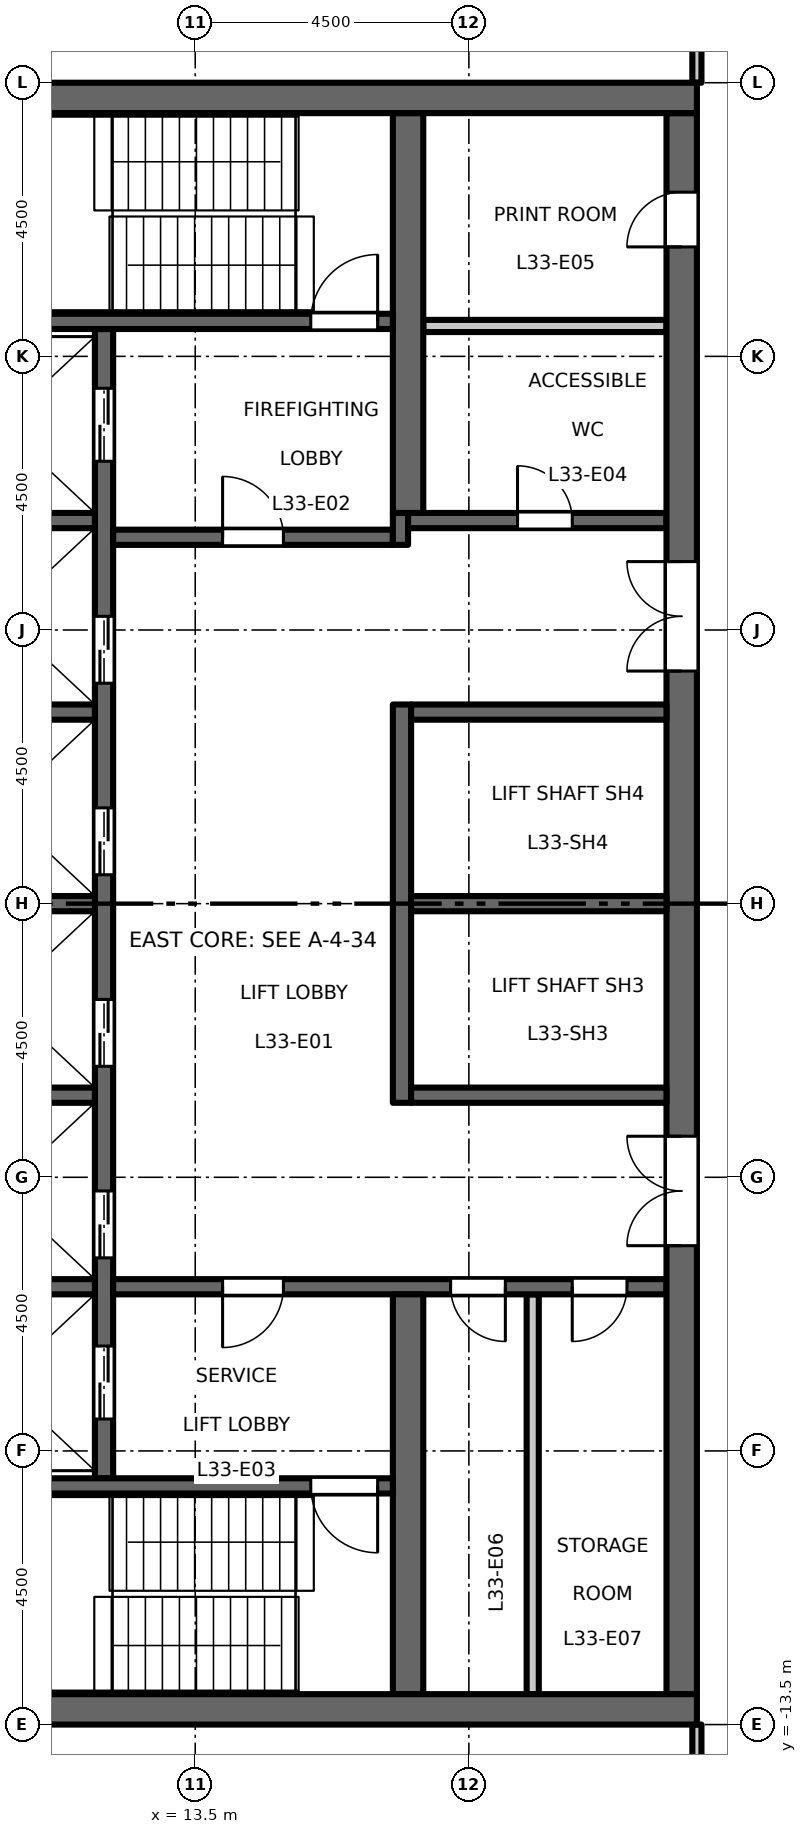
"""IFC4 building model, lengths in metres.
Left out: names, types, materials, properties, quantities, classifications, styles, units other than length and angle.
Written with IfcOpenShell. Run it as: python <this file> out.ifc"""

import sys

from ifc_helpers import new_model, si_unit, direction, frame, frame_2d, origin, place, context, subcontext, project, spatial, rectangle, extrude, element, fill, save


model = new_model("IFC4")
c1 = context("Model", 3, precision=1e-05, world=origin(), true_north=direction((0.0, 1.0)))
c2 = subcontext(c1, "Body", "Model", "MODEL_VIEW")
j1 = project(units=[si_unit("LENGTHUNIT", "METRE"), si_unit("PLANEANGLEUNIT", "RADIAN")], contexts=[c1])
p1 = place(None, origin())
s1 = spatial("IfcSite", under=j1, at=p1, CompositionType="ELEMENT")
p2 = place(p1, origin())
s2 = spatial("IfcBuilding", under=s1, at=p2, CompositionType="ELEMENT")
p3 = place(p2, frame((0.0, 0.0, 154.2)))
s3 = spatial("IfcBuildingStorey", under=s2, at=p3, CompositionType="ELEMENT", Elevation=154.2)
p4 = place(p3, frame((12.0, -9.45, 0.0), z_axis=(0.0, 0.0, 1.0), x_axis=(0.0, 1.0, 0.0)))
e1 = element("IfcWall", 1, at=p4, inside=s3, PredefinedType="SHEAR", context=c2, shape_type="SweptSolid", body=[
    extrude(rectangle(XDim=18.9, YDim=0.3, at=frame_2d((9.45, 0.0))), origin(), (0.0, 0.0, 1.0), 4.35),
])
p5 = place(p4, frame((3.625, 0.0, 0.0)))
e2 = element("IfcOpeningElement", 2, at=p5, cuts=e1, PredefinedType="OPENING", context=c2, shape_type="SweptSolid", body=[
    extrude(rectangle(XDim=1.1, YDim=2.1, at=frame_2d((0.55, 1.05))), frame((0.0, 0.16, 0.0), z_axis=(0.0, -1.0, 0.0), x_axis=(1.0, 0.0, 0.0)), (0.0, 0.0, 1.0), 0.32),
])
p6 = place(p4, frame((6.775, 0.0, 0.0)))
e3 = element("IfcOpeningElement", 3, at=p6, cuts=e1, PredefinedType="OPENING", context=c2, shape_type="SweptSolid", body=[
    extrude(rectangle(XDim=1.1, YDim=2.1, at=frame_2d((0.55, 1.05))), frame((0.0, 0.16, 0.0), z_axis=(0.0, -1.0, 0.0), x_axis=(1.0, 0.0, 0.0)), (0.0, 0.0, 1.0), 0.32),
])
p7 = place(p4, frame((9.925, 0.0, 0.0)))
e4 = element("IfcOpeningElement", 4, at=p7, cuts=e1, PredefinedType="OPENING", context=c2, shape_type="SweptSolid", body=[
    extrude(rectangle(XDim=1.1, YDim=2.1, at=frame_2d((0.55, 1.05))), frame((0.0, 0.16, 0.0), z_axis=(0.0, -1.0, 0.0), x_axis=(1.0, 0.0, 0.0)), (0.0, 0.0, 1.0), 0.32),
])
p8 = place(p4, frame((13.075, 0.0, 0.0)))
e5 = element("IfcOpeningElement", 5, at=p8, cuts=e1, PredefinedType="OPENING", context=c2, shape_type="SweptSolid", body=[
    extrude(rectangle(XDim=1.1, YDim=2.1, at=frame_2d((0.55, 1.05))), frame((0.0, 0.16, 0.0), z_axis=(0.0, -1.0, 0.0), x_axis=(1.0, 0.0, 0.0)), (0.0, 0.0, 1.0), 0.32),
])
p9 = place(p4, frame((16.725, 0.0, 0.0)))
e6 = element("IfcOpeningElement", 6, at=p9, cuts=e1, PredefinedType="OPENING", context=c2, shape_type="SweptSolid", body=[
    extrude(rectangle(XDim=1.2, YDim=2.1, at=frame_2d((0.6, 1.05))), frame((0.0, 0.16, 0.0), z_axis=(0.0, -1.0, 0.0), x_axis=(1.0, 0.0, 0.0)), (0.0, 0.0, 1.0), 0.32),
])
p10 = place(p4, frame((0.975, 0.0, 0.0)))
e7 = element("IfcOpeningElement", 7, at=p10, cuts=e1, PredefinedType="OPENING", context=c2, shape_type="SweptSolid", body=[
    extrude(rectangle(XDim=1.2, YDim=2.1, at=frame_2d((0.6, 1.05))), frame((0.0, 0.16, 0.0), z_axis=(0.0, -1.0, 0.0), x_axis=(1.0, 0.0, 0.0)), (0.0, 0.0, 1.0), 0.32),
])
p11 = place(p3, frame((12.15, 6.025, 0.0), z_axis=(0.0, 0.0, 1.0), x_axis=(1.0, 0.0, 0.0)))
e8 = element("IfcWall", 8, at=p11, inside=s3, PredefinedType="SHEAR", context=c2, shape_type="SweptSolid", body=[
    extrude(rectangle(XDim=4.6, YDim=0.25, at=frame_2d((2.3, 0.0))), origin(), (0.0, 0.0, 1.0), 4.35),
])
p12 = place(p11, frame((1.8, 0.0, 0.0)))
e9 = element("IfcOpeningElement", 9, at=p12, cuts=e8, PredefinedType="OPENING", context=c2, shape_type="SweptSolid", body=[
    extrude(rectangle(XDim=1.0, YDim=2.1, at=frame_2d((0.5, 1.05))), frame((0.0, 0.135, 0.0), z_axis=(0.0, -1.0, 0.0), x_axis=(1.0, 0.0, 0.0)), (0.0, 0.0, 1.0), 0.27),
])
p13 = place(p3, frame((16.875, 5.9, 0.0), z_axis=(0.0, 0.0, 1.0), x_axis=(0.0, 1.0, 0.0)))
e10 = element("IfcWall", 10, at=p13, inside=s3, PredefinedType="SHEAR", context=c2, shape_type="SweptSolid", body=[
    extrude(rectangle(XDim=0.525, YDim=0.25, at=frame_2d((0.263, 0.0))), origin(), (0.0, 0.0, 1.0), 4.35),
])
p14 = place(p3, frame((17.0, 6.3, 0.0), z_axis=(0.0, 0.0, 1.0), x_axis=(1.0, 0.0, 0.0)))
e11 = element("IfcWall", 11, at=p14, inside=s3, PredefinedType="SHEAR", context=c2, shape_type="SweptSolid", body=[
    extrude(rectangle(XDim=4.25, YDim=0.25, at=frame_2d((2.125, 0.0))), origin(), (0.0, 0.0, 1.0), 4.35),
])
p15 = place(p14, frame((1.8, 0.0, 0.0)))
e12 = element("IfcOpeningElement", 12, at=p15, cuts=e11, PredefinedType="OPENING", context=c2, shape_type="SweptSolid", body=[
    extrude(rectangle(XDim=0.9, YDim=2.1, at=frame_2d((0.45, 1.05))), frame((0.0, 0.135, 0.0), z_axis=(0.0, -1.0, 0.0), x_axis=(1.0, 0.0, 0.0)), (0.0, 0.0, 1.0), 0.27),
])
p16 = place(p3, frame((12.15, -6.3, 0.0), z_axis=(0.0, 0.0, 1.0), x_axis=(1.0, 0.0, 0.0)))
e13 = element("IfcWall", 13, at=p16, inside=s3, PredefinedType="SHEAR", context=c2, shape_type="SweptSolid", body=[
    extrude(rectangle(XDim=9.1, YDim=0.25, at=frame_2d((4.55, 0.0))), origin(), (0.0, 0.0, 1.0), 4.35),
])
p17 = place(p16, frame((1.8, 0.0, 0.0)))
e14 = element("IfcOpeningElement", 14, at=p17, cuts=e13, PredefinedType="OPENING", context=c2, shape_type="SweptSolid", body=[
    extrude(rectangle(XDim=1.0, YDim=2.1, at=frame_2d((0.5, 1.05))), frame((0.0, 0.135, 0.0), z_axis=(0.0, -1.0, 0.0), x_axis=(1.0, 0.0, 0.0)), (0.0, 0.0, 1.0), 0.27),
])
p18 = place(p16, frame((5.55, 0.0, 0.0)))
e15 = element("IfcOpeningElement", 15, at=p18, cuts=e13, PredefinedType="OPENING", context=c2, shape_type="SweptSolid", body=[
    extrude(rectangle(XDim=0.9, YDim=2.1, at=frame_2d((0.45, 1.05))), frame((0.0, 0.135, 0.0), z_axis=(0.0, -1.0, 0.0), x_axis=(1.0, 0.0, 0.0)), (0.0, 0.0, 1.0), 0.27),
])
p19 = place(p16, frame((7.55, 0.0, 0.0)))
e16 = element("IfcOpeningElement", 16, at=p19, cuts=e13, PredefinedType="OPENING", context=c2, shape_type="SweptSolid", body=[
    extrude(rectangle(XDim=0.9, YDim=2.1, at=frame_2d((0.45, 1.05))), frame((0.0, 0.135, 0.0), z_axis=(0.0, -1.0, 0.0), x_axis=(1.0, 0.0, 0.0)), (0.0, 0.0, 1.0), 0.27),
])
p20 = place(p3, frame((21.5, -13.0, 0.0), z_axis=(0.0, 0.0, 1.0), x_axis=(0.0, 1.0, 0.0)))
e17 = element("IfcWall", 17, at=p20, inside=s3, PredefinedType="SHEAR", context=c2, shape_type="SweptSolid", body=[
    extrude(rectangle(XDim=26.0, YDim=0.5, at=frame_2d((13.0, 0.0))), origin(), (0.0, 0.0, 1.0), 4.35),
])
p21 = place(p20, frame((16.825, 0.0, 0.0)))
e18 = element("IfcOpeningElement", 18, at=p21, cuts=e17, PredefinedType="OPENING", context=c2, shape_type="SweptSolid", body=[
    extrude(rectangle(XDim=1.8, YDim=2.1, at=frame_2d((0.9, 1.05))), frame((0.0, 0.26, 0.0), z_axis=(0.0, -1.0, 0.0), x_axis=(1.0, 0.0, 0.0)), (0.0, 0.0, 1.0), 0.52),
])
p22 = place(p20, frame((7.375, 0.0, 0.0)))
e19 = element("IfcOpeningElement", 19, at=p22, cuts=e17, PredefinedType="OPENING", context=c2, shape_type="SweptSolid", body=[
    extrude(rectangle(XDim=1.8, YDim=2.1, at=frame_2d((0.9, 1.05))), frame((0.0, 0.26, 0.0), z_axis=(0.0, -1.0, 0.0), x_axis=(1.0, 0.0, 0.0)), (0.0, 0.0, 1.0), 0.52),
])
p23 = place(p20, frame((23.8, 0.0, 0.0)))
e20 = element("IfcOpeningElement", 20, at=p23, cuts=e17, PredefinedType="OPENING", context=c2, shape_type="SweptSolid", body=[
    extrude(rectangle(XDim=0.9, YDim=2.1, at=frame_2d((0.45, 1.05))), frame((0.0, 0.26, 0.0), z_axis=(0.0, -1.0, 0.0), x_axis=(1.0, 0.0, 0.0)), (0.0, 0.0, 1.0), 0.52),
])
p24 = place(p3, frame((17.25, 9.5, 0.0), z_axis=(0.0, 0.0, 1.0), x_axis=(1.0, 0.0, 0.0)))
e21 = element("IfcWall", 21, at=p24, inside=s3, PredefinedType="PARTITIONING", context=c2, shape_type="SweptSolid", body=[
    extrude(rectangle(XDim=4.0, YDim=0.2, at=frame_2d((2.0, 0.0))), origin(), (0.0, 0.0, 1.0), 4.35),
])
p25 = place(p3, frame((19.05, -13.0, 0.0), z_axis=(0.0, 0.0, 1.0), x_axis=(0.0, 1.0, 0.0)))
e22 = element("IfcWall", 22, at=p25, inside=s3, PredefinedType="PARTITIONING", context=c2, shape_type="SweptSolid", body=[
    extrude(rectangle(XDim=6.575, YDim=0.2, at=frame_2d((3.288, 0.0))), origin(), (0.0, 0.0, 1.0), 4.35),
])
p26 = place(p3, frame((16.9, -3.275, 0.0), z_axis=(0.0, 0.0, 1.0), x_axis=(0.0, 1.0, 0.0)))
e23 = element("IfcWall", 23, at=p26, inside=s3, PredefinedType="SHEAR", context=c2, shape_type="SweptSolid", body=[
    extrude(rectangle(XDim=6.55, YDim=0.3, at=frame_2d((3.275, 0.0))), origin(), (0.0, 0.0, 1.0), 4.35),
])
for number, where, z_axis, x_axis in (
    (24, (17.05, 0.0, 0.0), (0.0, 0.0, 1.0), (1.0, 0.0, 0.0)),
    (25, (17.05, 3.15, 0.0), (0.0, 0.0, 1.0), (1.0, 0.0, 0.0)),
    (26, (17.05, -3.15, 0.0), (0.0, 0.0, 1.0), (1.0, 0.0, 0.0)),
):
    element("IfcWall", number, at=place(p3, frame(where, z_axis=z_axis, x_axis=x_axis)), inside=s3, PredefinedType="SHEAR", context=c2, shape_type="SweptSolid", body=[
        extrude(rectangle(XDim=4.2, YDim=0.25, at=frame_2d((2.1, 0.0))), origin(), (0.0, 0.0, 1.0), 4.35),
    ])
for number, where, z_axis, x_axis in (
    (27, (17.0, 6.425, 0.0), (0.0, 0.0, 1.0), (0.0, 1.0, 0.0)),
    (28, (17.0, -13.0, 0.0), (0.0, 0.0, 1.0), (0.0, 1.0, 0.0)),
):
    element("IfcWall", number, at=place(p3, frame(where, z_axis=z_axis, x_axis=x_axis)), inside=s3, PredefinedType="SHEAR", context=c2, shape_type="SweptSolid", body=[
        extrude(rectangle(XDim=6.575, YDim=0.5, at=frame_2d((3.288, 0.0))), origin(), (0.0, 0.0, 1.0), 4.35),
    ])
for number, where, z_axis, x_axis in (
    (29, (8.75, 0.0, 0.0), (0.0, 0.0, 1.0), (1.0, 0.0, 0.0)),
    (30, (8.75, 3.15, 0.0), (0.0, 0.0, 1.0), (1.0, 0.0, 0.0)),
    (31, (8.75, 6.3, 0.0), (0.0, 0.0, 1.0), (1.0, 0.0, 0.0)),
    (32, (8.75, -3.15, 0.0), (0.0, 0.0, 1.0), (1.0, 0.0, 0.0)),
    (33, (8.75, -6.3, 0.0), (0.0, 0.0, 1.0), (1.0, 0.0, 0.0)),
):
    element("IfcWall", number, at=place(p3, frame(where, z_axis=z_axis, x_axis=x_axis)), inside=s3, PredefinedType="SHEAR", context=c2, shape_type="SweptSolid", body=[
        extrude(rectangle(XDim=3.1, YDim=0.25, at=frame_2d((1.55, 0.0))), origin(), (0.0, 0.0, 1.0), 4.35),
    ])
p27 = place(p3, frame((8.75, 9.575, 0.0), z_axis=(0.0, 0.0, 1.0), x_axis=(1.0, 0.0, 0.0)))
e34 = element("IfcWall", 34, at=p27, inside=s3, PredefinedType="SHEAR", context=c2, shape_type="SweptSolid", body=[
    extrude(rectangle(XDim=8.0, YDim=0.25, at=frame_2d((4.0, 0.0))), origin(), (0.0, 0.0, 1.0), 4.35),
])
p28 = place(p27, frame((6.65, 0.0, 0.0)))
e35 = element("IfcOpeningElement", 35, at=p28, cuts=e34, PredefinedType="OPENING", context=c2, shape_type="SweptSolid", body=[
    extrude(rectangle(XDim=1.1, YDim=2.1, at=frame_2d((0.55, 1.05))), frame((0.0, 0.135, 0.0), z_axis=(0.0, -1.0, 0.0), x_axis=(1.0, 0.0, 0.0)), (0.0, 0.0, 1.0), 0.27),
])
p29 = place(p3, frame((8.75, -9.575, 0.0), z_axis=(0.0, 0.0, 1.0), x_axis=(1.0, 0.0, 0.0)))
e36 = element("IfcWall", 36, at=p29, inside=s3, PredefinedType="SHEAR", context=c2, shape_type="SweptSolid", body=[
    extrude(rectangle(XDim=8.0, YDim=0.25, at=frame_2d((4.0, 0.0))), origin(), (0.0, 0.0, 1.0), 4.35),
])
p30 = place(p29, frame((6.65, 0.0, 0.0)))
e37 = element("IfcOpeningElement", 37, at=p30, cuts=e36, PredefinedType="OPENING", context=c2, shape_type="SweptSolid", body=[
    extrude(rectangle(XDim=1.1, YDim=2.1, at=frame_2d((0.55, 1.05))), frame((0.0, 0.135, 0.0), z_axis=(0.0, -1.0, 0.0), x_axis=(1.0, 0.0, 0.0)), (0.0, 0.0, 1.0), 0.27),
])
for number, where, z_axis, x_axis in (
    (38, (8.25, 13.25, 0.0), (0.0, 0.0, 1.0), (1.0, 0.0, 0.0)),
    (39, (8.25, -13.25, 0.0), (0.0, 0.0, 1.0), (1.0, 0.0, 0.0)),
):
    element("IfcWall", number, at=place(p3, frame(where, z_axis=z_axis, x_axis=x_axis)), inside=s3, PredefinedType="SHEAR", context=c2, shape_type="SweptSolid", body=[
        extrude(rectangle(XDim=13.5, YDim=0.5, at=frame_2d((6.75, 0.0))), origin(), (0.0, 0.0, 1.0), 4.35),
    ])
for number, where, z_axis, x_axis in (
    (40, (21.75, -16.925, 0.0), (0.0, 0.0, 1.0), (0.0, 1.0, 0.0)),
    (41, (21.75, 13.5, 0.0), (0.0, 0.0, 1.0), (0.0, 1.0, 0.0)),
):
    element("IfcWall", number, at=place(p3, frame(where, z_axis=z_axis, x_axis=x_axis)), inside=s3, PredefinedType="PARTITIONING", context=c2, shape_type="SweptSolid", body=[
        extrude(rectangle(XDim=3.425, YDim=0.15, at=frame_2d((1.712, 0.0))), origin(), (0.0, 0.0, 1.0), 4.35),
    ])
p31 = place(p12, origin())
e42 = element("IfcDoor", 42, at=p31, inside=s3, OperationType="SINGLE_SWING_RIGHT", PredefinedType="DOOR", context=c2, shape_type="SweptSolid", body=[
    extrude(rectangle(XDim=1.0, YDim=2.1, at=frame_2d((0.5, 1.05))), frame((0.0, 0.025, 0.0), z_axis=(0.0, -1.0, 0.0), x_axis=(1.0, 0.0, 0.0)), (0.0, 0.0, 1.0), 0.05),
])
fill(e9, e42)
p32 = place(p17, origin())
e43 = element("IfcDoor", 43, at=p32, inside=s3, OperationType="SINGLE_SWING_LEFT", PredefinedType="DOOR", context=c2, shape_type="SweptSolid", body=[
    extrude(rectangle(XDim=1.0, YDim=2.1, at=frame_2d((0.5, 1.05))), frame((0.0, 0.025, 0.0), z_axis=(0.0, -1.0, 0.0), x_axis=(1.0, 0.0, 0.0)), (0.0, 0.0, 1.0), 0.05),
])
fill(e14, e43)
p33 = place(p28, origin())
e44 = element("IfcDoor", 44, at=p33, inside=s3, OperationType="SINGLE_SWING_LEFT", PredefinedType="DOOR", context=c2, shape_type="SweptSolid", body=[
    extrude(rectangle(XDim=1.1, YDim=2.1, at=frame_2d((0.55, 1.05))), frame((0.0, 0.025, 0.0), z_axis=(0.0, -1.0, 0.0), x_axis=(1.0, 0.0, 0.0)), (0.0, 0.0, 1.0), 0.05),
])
fill(e35, e44)
p34 = place(p30, origin())
e45 = element("IfcDoor", 45, at=p34, inside=s3, OperationType="SINGLE_SWING_RIGHT", PredefinedType="DOOR", context=c2, shape_type="SweptSolid", body=[
    extrude(rectangle(XDim=1.1, YDim=2.1, at=frame_2d((0.55, 1.05))), frame((0.0, 0.025, 0.0), z_axis=(0.0, -1.0, 0.0), x_axis=(1.0, 0.0, 0.0)), (0.0, 0.0, 1.0), 0.05),
])
fill(e37, e45)
p35 = place(p21, origin())
e46 = element("IfcDoor", 46, at=p35, inside=s3, OperationType="DOUBLE_DOOR_DOUBLE_SWING", PredefinedType="DOOR", context=c2, shape_type="SweptSolid", body=[
    extrude(rectangle(XDim=1.8, YDim=2.1, at=frame_2d((0.9, 1.05))), frame((0.0, 0.025, 0.0), z_axis=(0.0, -1.0, 0.0), x_axis=(1.0, 0.0, 0.0)), (0.0, 0.0, 1.0), 0.05),
])
fill(e18, e46)
p36 = place(p22, origin())
e47 = element("IfcDoor", 47, at=p36, inside=s3, OperationType="DOUBLE_DOOR_DOUBLE_SWING", PredefinedType="DOOR", context=c2, shape_type="SweptSolid", body=[
    extrude(rectangle(XDim=1.8, YDim=2.1, at=frame_2d((0.9, 1.05))), frame((0.0, 0.025, 0.0), z_axis=(0.0, -1.0, 0.0), x_axis=(1.0, 0.0, 0.0)), (0.0, 0.0, 1.0), 0.05),
])
fill(e19, e47)
p37 = place(p5, origin())
e48 = element("IfcDoor", 48, at=p37, inside=s3, OperationType="DOUBLE_DOOR_SLIDING", PredefinedType="DOOR", context=c2, shape_type="SweptSolid", body=[
    extrude(rectangle(XDim=1.1, YDim=2.1, at=frame_2d((0.55, 1.05))), frame((0.0, 0.025, 0.0), z_axis=(0.0, -1.0, 0.0), x_axis=(1.0, 0.0, 0.0)), (0.0, 0.0, 1.0), 0.05),
])
fill(e2, e48)
p38 = place(p6, origin())
e49 = element("IfcDoor", 49, at=p38, inside=s3, OperationType="DOUBLE_DOOR_SLIDING", PredefinedType="DOOR", context=c2, shape_type="SweptSolid", body=[
    extrude(rectangle(XDim=1.1, YDim=2.1, at=frame_2d((0.55, 1.05))), frame((0.0, 0.025, 0.0), z_axis=(0.0, -1.0, 0.0), x_axis=(1.0, 0.0, 0.0)), (0.0, 0.0, 1.0), 0.05),
])
fill(e3, e49)
p39 = place(p7, origin())
e50 = element("IfcDoor", 50, at=p39, inside=s3, OperationType="DOUBLE_DOOR_SLIDING", PredefinedType="DOOR", context=c2, shape_type="SweptSolid", body=[
    extrude(rectangle(XDim=1.1, YDim=2.1, at=frame_2d((0.55, 1.05))), frame((0.0, 0.025, 0.0), z_axis=(0.0, -1.0, 0.0), x_axis=(1.0, 0.0, 0.0)), (0.0, 0.0, 1.0), 0.05),
])
fill(e4, e50)
p40 = place(p8, origin())
e51 = element("IfcDoor", 51, at=p40, inside=s3, OperationType="DOUBLE_DOOR_SLIDING", PredefinedType="DOOR", context=c2, shape_type="SweptSolid", body=[
    extrude(rectangle(XDim=1.1, YDim=2.1, at=frame_2d((0.55, 1.05))), frame((0.0, 0.025, 0.0), z_axis=(0.0, -1.0, 0.0), x_axis=(1.0, 0.0, 0.0)), (0.0, 0.0, 1.0), 0.05),
])
fill(e5, e51)
p41 = place(p9, origin())
e52 = element("IfcDoor", 52, at=p41, inside=s3, OperationType="DOUBLE_DOOR_SLIDING", PredefinedType="DOOR", context=c2, shape_type="SweptSolid", body=[
    extrude(rectangle(XDim=1.2, YDim=2.1, at=frame_2d((0.6, 1.05))), frame((0.0, 0.025, 0.0), z_axis=(0.0, -1.0, 0.0), x_axis=(1.0, 0.0, 0.0)), (0.0, 0.0, 1.0), 0.05),
])
fill(e6, e52)
p42 = place(p10, origin())
e53 = element("IfcDoor", 53, at=p42, inside=s3, OperationType="DOUBLE_DOOR_SLIDING", PredefinedType="DOOR", context=c2, shape_type="SweptSolid", body=[
    extrude(rectangle(XDim=1.2, YDim=2.1, at=frame_2d((0.6, 1.05))), frame((0.0, 0.025, 0.0), z_axis=(0.0, -1.0, 0.0), x_axis=(1.0, 0.0, 0.0)), (0.0, 0.0, 1.0), 0.05),
])
fill(e7, e53)
p43 = place(p15, origin())
e54 = element("IfcDoor", 54, at=p43, inside=s3, OperationType="SINGLE_SWING_RIGHT", PredefinedType="DOOR", context=c2, shape_type="SweptSolid", body=[
    extrude(rectangle(XDim=0.9, YDim=2.1, at=frame_2d((0.45, 1.05))), frame((0.0, 0.025, 0.0), z_axis=(0.0, -1.0, 0.0), x_axis=(1.0, 0.0, 0.0)), (0.0, 0.0, 1.0), 0.05),
])
fill(e12, e54)
p44 = place(p23, origin())
e55 = element("IfcDoor", 55, at=p44, inside=s3, OperationType="SINGLE_SWING_RIGHT", PredefinedType="DOOR", context=c2, shape_type="SweptSolid", body=[
    extrude(rectangle(XDim=0.9, YDim=2.1, at=frame_2d((0.45, 1.05))), frame((0.0, 0.025, 0.0), z_axis=(0.0, -1.0, 0.0), x_axis=(1.0, 0.0, 0.0)), (0.0, 0.0, 1.0), 0.05),
])
fill(e20, e55)
p45 = place(p18, origin())
e56 = element("IfcDoor", 56, at=p45, inside=s3, OperationType="SINGLE_SWING_RIGHT", PredefinedType="DOOR", context=c2, shape_type="SweptSolid", body=[
    extrude(rectangle(XDim=0.9, YDim=2.1, at=frame_2d((0.45, 1.05))), frame((0.0, 0.025, 0.0), z_axis=(0.0, -1.0, 0.0), x_axis=(1.0, 0.0, 0.0)), (0.0, 0.0, 1.0), 0.05),
])
fill(e15, e56)
p46 = place(p19, origin())
e57 = element("IfcDoor", 57, at=p46, inside=s3, OperationType="SINGLE_SWING_LEFT", PredefinedType="DOOR", context=c2, shape_type="SweptSolid", body=[
    extrude(rectangle(XDim=0.9, YDim=2.1, at=frame_2d((0.45, 1.05))), frame((0.0, 0.025, 0.0), z_axis=(0.0, -1.0, 0.0), x_axis=(1.0, 0.0, 0.0)), (0.0, 0.0, 1.0), 0.05),
])
fill(e16, e57)
save(model, sys.argv[1])
